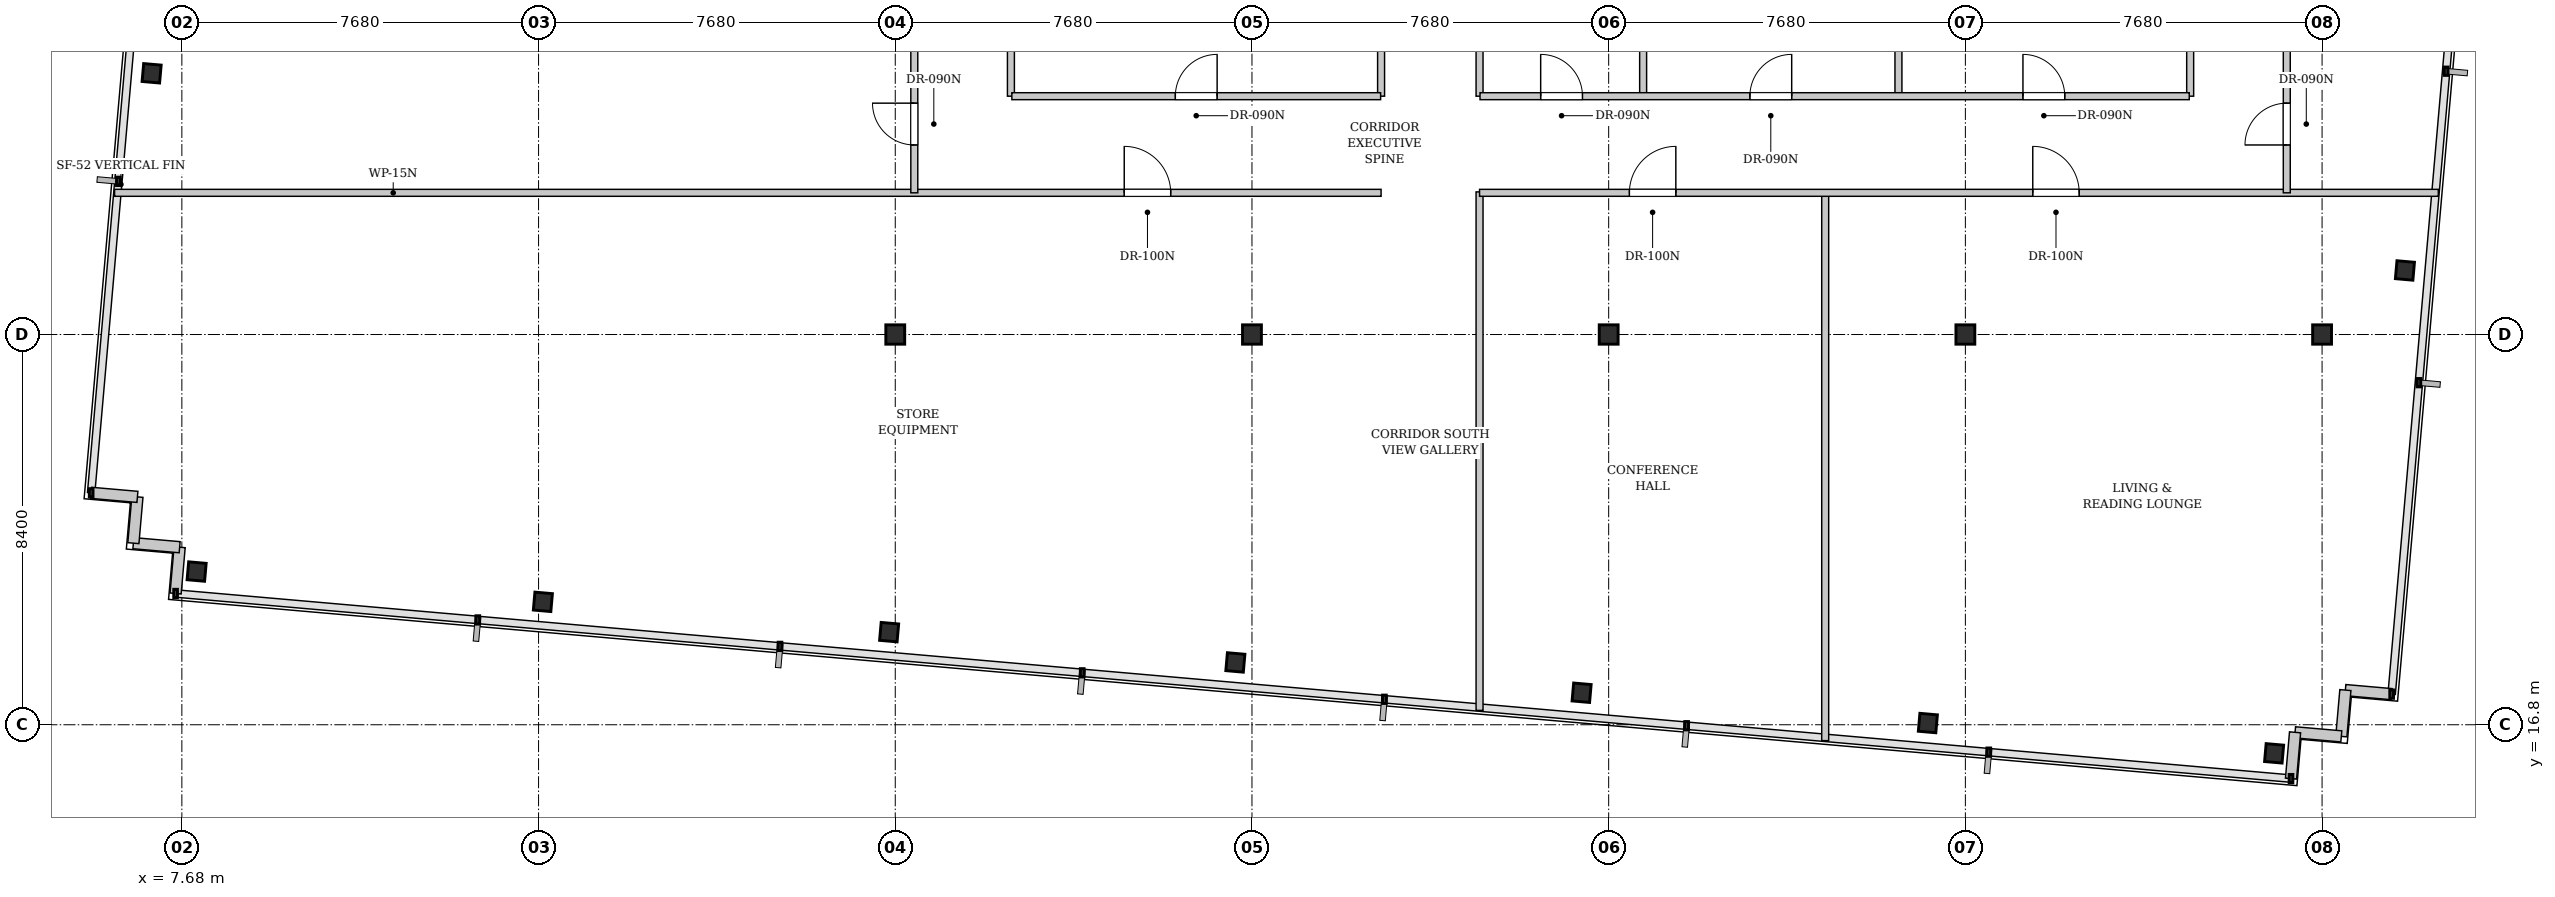
"""IFC4 building model, lengths in metres.
Left out: names, types, materials, properties, quantities, classifications, styles, units other than length and angle.
Written with IfcOpenShell. Run it as: python <this file> out.ifc"""

import sys

from ifc_helpers import new_model, si_unit, direction, frame, frame_2d, origin, origin_2d, place, context, subcontext, project, spatial, rectangle, i_section, extrude, element, fill, save


model = new_model("IFC4")
c1 = context("Model", 3, precision=1e-05, world=origin(), true_north=direction((0.0, 1.0)))
c2 = subcontext(c1, "Body", "Model", "MODEL_VIEW")
j1 = project(units=[si_unit("LENGTHUNIT", "METRE"), si_unit("PLANEANGLEUNIT", "RADIAN")], contexts=[c1])
p1 = place(None, origin())
s1 = spatial("IfcSite", under=j1, at=p1, CompositionType="ELEMENT")
p2 = place(p1, origin())
s2 = spatial("IfcBuilding", under=s1, at=p2, CompositionType="ELEMENT")
p3 = place(p2, frame((0.0, 0.0, 265.9)))
s3 = spatial("IfcBuildingStorey", under=s2, at=p3, CompositionType="ELEMENT", Elevation=265.9)
for number, where, z_axis, x_axis in (
    (1, (23.04, 25.2, 0.0), (0.0, 0.0, 1.0), (1.0, 0.0, 0.0)),
    (2, (30.72, 25.2, 0.0), (0.0, 0.0, 1.0), (1.0, 0.0, 0.0)),
    (3, (38.4, 25.2, 0.0), (0.0, 0.0, 1.0), (1.0, 0.0, 0.0)),
    (4, (46.08, 25.2, 0.0), (0.0, 0.0, 1.0), (1.0, 0.0, 0.0)),
    (5, (53.76, 25.2, 0.0), (0.0, 0.0, 1.0), (1.0, 0.0, 0.0)),
):
    element("IfcColumn", number, at=place(p3, frame(where, z_axis=z_axis, x_axis=x_axis)), inside=s3, PredefinedType="COLUMN", context=c2, shape_type="SweptSolid", body=[
        extrude(i_section(OverallWidth=0.406, OverallDepth=0.416, WebThickness=0.03, FlangeThickness=0.048, FilletRadius=0.015, at=origin_2d()), origin(), (0.0, 0.0, 1.0), 3.4),
    ])
for number, where, z_axis, x_axis in (
    (6, (7.998, 20.098, 0.0), (0.0, 0.0, 1.0), (0.996, -0.087, 0.0)),
    (7, (15.453, 19.446, 0.0), (0.0, 0.0, 1.0), (0.996, -0.087, 0.0)),
    (8, (22.908, 18.793, 0.0), (0.0, 0.0, 1.0), (0.996, -0.087, 0.0)),
    (9, (30.363, 18.141, 0.0), (0.0, 0.0, 1.0), (0.996, -0.087, 0.0)),
    (10, (37.817, 17.489, 0.0), (0.0, 0.0, 1.0), (0.996, -0.087, 0.0)),
    (11, (45.272, 16.837, 0.0), (0.0, 0.0, 1.0), (0.996, -0.087, 0.0)),
    (12, (52.727, 16.185, 0.0), (0.0, 0.0, 1.0), (0.996, -0.087, 0.0)),
    (13, (7.029, 30.823, 0.0), (0.0, 0.0, 1.0), (0.996, -0.087, 0.0)),
    (14, (55.544, 26.579, 0.0), (0.0, 0.0, 1.0), (0.996, -0.087, 0.0)),
):
    element("IfcColumn", number, at=place(p3, frame(where, z_axis=z_axis, x_axis=x_axis)), inside=s3, PredefinedType="COLUMN", context=c2, shape_type="SweptSolid", body=[
        extrude(i_section(OverallWidth=0.378, OverallDepth=0.387, WebThickness=0.021, FlangeThickness=0.033, FilletRadius=0.015, at=origin_2d()), origin(), (0.0, 0.0, 1.0), 3.4),
    ])
for number, where, z_axis, x_axis in (
    (15, (7.545, 19.625, 0.0), (0.0, 0.0, 1.0), (0.087, 0.996, 0.0)),
    (16, (7.632, 20.622, 0.0), (0.0, 0.0, 1.0), (-0.996, 0.087, 0.0)),
):
    element("IfcWall", number, at=place(p3, frame(where, z_axis=z_axis, x_axis=x_axis)), inside=s3, PredefinedType="SOLIDWALL", context=c2, shape_type="SweptSolid", body=[
        extrude(rectangle(XDim=1.0, YDim=0.24, at=frame_2d((0.5, 0.0))), origin(), (0.0, 0.0, 1.0), 3.18),
    ])
for number, where, z_axis, x_axis in (
    (17, (6.636, 20.709, 0.0), (0.0, 0.0, 1.0), (0.087, 0.996, 0.0)),
    (18, (6.723, 21.705, 0.0), (0.0, 0.0, 1.0), (-0.996, 0.087, 0.0)),
):
    element("IfcWall", number, at=place(p3, frame(where, z_axis=z_axis, x_axis=x_axis)), inside=s3, PredefinedType="SOLIDWALL", context=c2, shape_type="SweptSolid", body=[
        extrude(rectangle(XDim=1.0, YDim=0.24, at=frame_2d((0.5, 0.0))), origin(), (0.0, 0.0, 1.0), 3.18),
    ])
for number, where, z_axis, x_axis in (
    (19, (55.258, 17.459, 0.0), (0.0, 0.0, 1.0), (-0.996, 0.087, 0.0)),
    (20, (54.262, 17.546, 0.0), (0.0, 0.0, 1.0), (-0.087, -0.996, 0.0)),
):
    element("IfcWall", number, at=place(p3, frame(where, z_axis=z_axis, x_axis=x_axis)), inside=s3, PredefinedType="SOLIDWALL", context=c2, shape_type="SweptSolid", body=[
        extrude(rectangle(XDim=1.0, YDim=0.24, at=frame_2d((0.5, 0.0))), origin(), (0.0, 0.0, 1.0), 3.18),
    ])
for number, where, z_axis, x_axis in (
    (21, (54.175, 16.55, 0.0), (0.0, 0.0, 1.0), (-0.996, 0.087, 0.0)),
    (22, (53.178, 16.637, 0.0), (0.0, 0.0, 1.0), (-0.087, -0.996, 0.0)),
):
    element("IfcWall", number, at=place(p3, frame(where, z_axis=z_axis, x_axis=x_axis)), inside=s3, PredefinedType="SOLIDWALL", context=c2, shape_type="SweptSolid", body=[
        extrude(rectangle(XDim=1.0, YDim=0.24, at=frame_2d((0.5, 0.0))), origin(), (0.0, 0.0, 1.0), 3.18),
    ])
p4 = place(p3, frame((35.62, 17.109, 0.0), z_axis=(0.0, 0.0, 1.0), x_axis=(0.0, 1.0, 0.0)))
e23 = element("IfcWall", 23, at=p4, inside=s3, PredefinedType="PARTITIONING", context=c2, shape_type="SweptSolid", body=[
    extrude(rectangle(XDim=11.161, YDim=0.15, at=frame_2d((5.581, 0.0))), origin(), (0.0, 0.0, 1.0), 3.18),
])
p5 = place(p3, frame((43.062, 16.458, 0.0), z_axis=(0.0, 0.0, 1.0), x_axis=(0.0, 1.0, 0.0)))
e24 = element("IfcWall", 24, at=p5, inside=s3, PredefinedType="PARTITIONING", context=c2, shape_type="SweptSolid", body=[
    extrude(rectangle(XDim=11.812, YDim=0.15, at=frame_2d((5.906, 0.0))), origin(), (0.0, 0.0, 1.0), 3.18),
])
p6 = place(p3, frame((6.232, 28.25, 0.0), z_axis=(0.0, 0.0, 1.0), x_axis=(1.0, 0.0, 0.0)))
e25 = element("IfcWall", 25, at=p6, inside=s3, PredefinedType="PARTITIONING", context=c2, shape_type="SweptSolid", body=[
    extrude(rectangle(XDim=27.268, YDim=0.15, at=frame_2d((13.634, 0.0))), origin(), (0.0, 0.0, 1.0), 3.18),
])
p7 = place(p6, frame((21.738, 0.0, 0.0)))
e26 = element("IfcOpeningElement", 26, at=p7, cuts=e25, PredefinedType="OPENING", context=c2, shape_type="SweptSolid", body=[
    extrude(rectangle(XDim=1.0, YDim=2.15, at=frame_2d((0.5, 1.075))), frame((0.0, 0.085, 0.0), z_axis=(0.0, -1.0, 0.0), x_axis=(1.0, 0.0, 0.0)), (0.0, 0.0, 1.0), 0.17),
])
p8 = place(p3, frame((35.62, 28.25, 0.0), z_axis=(0.0, 0.0, 1.0), x_axis=(1.0, 0.0, 0.0)))
e27 = element("IfcWall", 27, at=p8, inside=s3, PredefinedType="PARTITIONING", context=c2, shape_type="SweptSolid", body=[
    extrude(rectangle(XDim=20.642, YDim=0.15, at=frame_2d((10.321, 0.0))), origin(), (0.0, 0.0, 1.0), 3.18),
])
p9 = place(p8, frame((3.226, 0.0, 0.0)))
e28 = element("IfcOpeningElement", 28, at=p9, cuts=e27, PredefinedType="OPENING", context=c2, shape_type="SweptSolid", body=[
    extrude(rectangle(XDim=1.0, YDim=2.15, at=frame_2d((0.5, 1.075))), frame((0.0, 0.085, 0.0), z_axis=(0.0, -1.0, 0.0), x_axis=(1.0, 0.0, 0.0)), (0.0, 0.0, 1.0), 0.17),
])
p10 = place(p8, frame((11.911, 0.0, 0.0)))
e29 = element("IfcOpeningElement", 29, at=p10, cuts=e27, PredefinedType="OPENING", context=c2, shape_type="SweptSolid", body=[
    extrude(rectangle(XDim=1.0, YDim=2.15, at=frame_2d((0.5, 1.075))), frame((0.0, 0.085, 0.0), z_axis=(0.0, -1.0, 0.0), x_axis=(1.0, 0.0, 0.0)), (0.0, 0.0, 1.0), 0.17),
])
p11 = place(p3, frame((23.45, 28.25, 0.0), z_axis=(0.0, 0.0, 1.0), x_axis=(0.0, 1.0, 0.0)))
e30 = element("IfcWall", 30, at=p11, inside=s3, PredefinedType="PARTITIONING", context=c2, shape_type="SweptSolid", body=[
    extrude(rectangle(XDim=6.89, YDim=0.15, at=frame_2d((3.445, 0.0))), origin(), (0.0, 0.0, 1.0), 3.18),
])
p12 = place(p11, frame((1.03, 0.0, 0.0)))
e31 = element("IfcOpeningElement", 31, at=p12, cuts=e30, PredefinedType="OPENING", context=c2, shape_type="SweptSolid", body=[
    extrude(rectangle(XDim=0.9, YDim=2.15, at=frame_2d((0.45, 1.075))), frame((0.0, 0.085, 0.0), z_axis=(0.0, -1.0, 0.0), x_axis=(1.0, 0.0, 0.0)), (0.0, 0.0, 1.0), 0.17),
])
p13 = place(p3, frame((53.0, 28.25, 0.0), z_axis=(0.0, 0.0, 1.0), x_axis=(0.0, 1.0, 0.0)))
e32 = element("IfcWall", 32, at=p13, inside=s3, PredefinedType="PARTITIONING", context=c2, shape_type="SweptSolid", body=[
    extrude(rectangle(XDim=6.89, YDim=0.15, at=frame_2d((3.445, 0.0))), origin(), (0.0, 0.0, 1.0), 3.18),
])
p14 = place(p13, frame((1.03, 0.0, 0.0)))
e33 = element("IfcOpeningElement", 33, at=p14, cuts=e32, PredefinedType="OPENING", context=c2, shape_type="SweptSolid", body=[
    extrude(rectangle(XDim=0.9, YDim=2.15, at=frame_2d((0.45, 1.075))), frame((0.0, 0.085, 0.0), z_axis=(0.0, -1.0, 0.0), x_axis=(1.0, 0.0, 0.0)), (0.0, 0.0, 1.0), 0.17),
])
for number, where, z_axis, x_axis in (
    (34, (25.53, 30.33, 0.0), (0.0, 0.0, 1.0), (0.0, 1.0, 0.0)),
    (35, (50.92, 30.33, 0.0), (0.0, 0.0, 1.0), (0.0, 1.0, 0.0)),
    (36, (33.5, 30.33, 0.0), (0.0, 0.0, 1.0), (0.0, 1.0, 0.0)),
    (37, (35.62, 30.33, 0.0), (0.0, 0.0, 1.0), (0.0, 1.0, 0.0)),
):
    element("IfcWall", number, at=place(p3, frame(where, z_axis=z_axis, x_axis=x_axis)), inside=s3, PredefinedType="PARTITIONING", context=c2, shape_type="SweptSolid", body=[
        extrude(rectangle(XDim=2.72, YDim=0.15, at=frame_2d((1.36, 0.0))), origin(), (0.0, 0.0, 1.0), 3.18),
    ])
p15 = place(p3, frame((25.55, 30.33, 0.0), z_axis=(0.0, 0.0, 1.0), x_axis=(1.0, 0.0, 0.0)))
e38 = element("IfcWall", 38, at=p15, inside=s3, PredefinedType="PARTITIONING", context=c2, shape_type="SweptSolid", body=[
    extrude(rectangle(XDim=7.94, YDim=0.15, at=frame_2d((3.97, 0.0))), origin(), (0.0, 0.0, 1.0), 3.18),
])
p16 = place(p15, frame((3.52, 0.0, 0.0)))
e39 = element("IfcOpeningElement", 39, at=p16, cuts=e38, PredefinedType="OPENING", context=c2, shape_type="SweptSolid", body=[
    extrude(rectangle(XDim=0.9, YDim=2.15, at=frame_2d((0.45, 1.075))), frame((0.0, 0.085, 0.0), z_axis=(0.0, -1.0, 0.0), x_axis=(1.0, 0.0, 0.0)), (0.0, 0.0, 1.0), 0.17),
])
for number, where, z_axis, x_axis in (
    (40, (39.142, 30.33, 0.0), (0.0, 0.0, 1.0), (0.0, 1.0, 0.0)),
    (41, (44.639, 30.33, 0.0), (0.0, 0.0, 1.0), (0.0, 1.0, 0.0)),
):
    element("IfcWall", number, at=place(p3, frame(where, z_axis=z_axis, x_axis=x_axis)), inside=s3, PredefinedType="PARTITIONING", context=c2, shape_type="SweptSolid", body=[
        extrude(rectangle(XDim=2.72, YDim=0.15, at=frame_2d((1.36, 0.0))), origin(), (0.0, 0.0, 1.0), 3.18),
    ])
p17 = place(p3, frame((35.63, 30.33, 0.0), z_axis=(0.0, 0.0, 1.0), x_axis=(1.0, 0.0, 0.0)))
e42 = element("IfcWall", 42, at=p17, inside=s3, PredefinedType="PARTITIONING", context=c2, shape_type="SweptSolid", body=[
    extrude(rectangle(XDim=15.27, YDim=0.15, at=frame_2d((7.635, 0.0))), origin(), (0.0, 0.0, 1.0), 3.18),
])
p18 = place(p17, frame((1.306, 0.0, 0.0)))
e43 = element("IfcOpeningElement", 43, at=p18, cuts=e42, PredefinedType="OPENING", context=c2, shape_type="SweptSolid", body=[
    extrude(rectangle(XDim=0.9, YDim=2.15, at=frame_2d((0.45, 1.075))), frame((0.0, 0.085, 0.0), z_axis=(0.0, -1.0, 0.0), x_axis=(1.0, 0.0, 0.0)), (0.0, 0.0, 1.0), 0.17),
])
p19 = place(p17, frame((5.811, 0.0, 0.0)))
e44 = element("IfcOpeningElement", 44, at=p19, cuts=e42, PredefinedType="OPENING", context=c2, shape_type="SweptSolid", body=[
    extrude(rectangle(XDim=0.9, YDim=2.15, at=frame_2d((0.45, 1.075))), frame((0.0, 0.085, 0.0), z_axis=(0.0, -1.0, 0.0), x_axis=(1.0, 0.0, 0.0)), (0.0, 0.0, 1.0), 0.17),
])
p20 = place(p17, frame((11.689, 0.0, 0.0)))
e45 = element("IfcOpeningElement", 45, at=p20, cuts=e42, PredefinedType="OPENING", context=c2, shape_type="SweptSolid", body=[
    extrude(rectangle(XDim=0.9, YDim=2.15, at=frame_2d((0.45, 1.075))), frame((0.0, 0.085, 0.0), z_axis=(0.0, -1.0, 0.0), x_axis=(1.0, 0.0, 0.0)), (0.0, 0.0, 1.0), 0.17),
])
p21 = place(p7, origin())
e46 = element("IfcDoor", 46, at=p21, inside=s3, OperationType="SINGLE_SWING_LEFT", PredefinedType="DOOR", context=c2, shape_type="SweptSolid", body=[
    extrude(rectangle(XDim=1.0, YDim=2.15, at=frame_2d((0.5, 1.075))), frame((0.0, 0.025, 0.0), z_axis=(0.0, -1.0, 0.0), x_axis=(1.0, 0.0, 0.0)), (0.0, 0.0, 1.0), 0.05),
])
fill(e26, e46)
p22 = place(p9, origin())
e47 = element("IfcDoor", 47, at=p22, inside=s3, OperationType="SINGLE_SWING_RIGHT", PredefinedType="DOOR", context=c2, shape_type="SweptSolid", body=[
    extrude(rectangle(XDim=1.0, YDim=2.15, at=frame_2d((0.5, 1.075))), frame((0.0, 0.025, 0.0), z_axis=(0.0, -1.0, 0.0), x_axis=(1.0, 0.0, 0.0)), (0.0, 0.0, 1.0), 0.05),
])
fill(e28, e47)
p23 = place(p10, origin())
e48 = element("IfcDoor", 48, at=p23, inside=s3, OperationType="SINGLE_SWING_LEFT", PredefinedType="DOOR", context=c2, shape_type="SweptSolid", body=[
    extrude(rectangle(XDim=1.0, YDim=2.15, at=frame_2d((0.5, 1.075))), frame((0.0, 0.025, 0.0), z_axis=(0.0, -1.0, 0.0), x_axis=(1.0, 0.0, 0.0)), (0.0, 0.0, 1.0), 0.05),
])
fill(e29, e48)
p24 = place(p12, origin())
e49 = element("IfcDoor", 49, at=p24, inside=s3, OperationType="SINGLE_SWING_RIGHT", PredefinedType="DOOR", context=c2, shape_type="SweptSolid", body=[
    extrude(rectangle(XDim=0.9, YDim=2.15, at=frame_2d((0.45, 1.075))), frame((0.0, 0.025, 0.0), z_axis=(0.0, -1.0, 0.0), x_axis=(1.0, 0.0, 0.0)), (0.0, 0.0, 1.0), 0.05),
])
fill(e31, e49)
p25 = place(p14, origin())
e50 = element("IfcDoor", 50, at=p25, inside=s3, OperationType="SINGLE_SWING_LEFT", PredefinedType="DOOR", context=c2, shape_type="SweptSolid", body=[
    extrude(rectangle(XDim=0.9, YDim=2.15, at=frame_2d((0.45, 1.075))), frame((0.0, 0.025, 0.0), z_axis=(0.0, -1.0, 0.0), x_axis=(1.0, 0.0, 0.0)), (0.0, 0.0, 1.0), 0.05),
])
fill(e33, e50)
p26 = place(p16, origin())
e51 = element("IfcDoor", 51, at=p26, inside=s3, OperationType="SINGLE_SWING_RIGHT", PredefinedType="DOOR", context=c2, shape_type="SweptSolid", body=[
    extrude(rectangle(XDim=0.9, YDim=2.15, at=frame_2d((0.45, 1.075))), frame((0.0, 0.025, 0.0), z_axis=(0.0, -1.0, 0.0), x_axis=(1.0, 0.0, 0.0)), (0.0, 0.0, 1.0), 0.05),
])
fill(e39, e51)
p27 = place(p18, origin())
e52 = element("IfcDoor", 52, at=p27, inside=s3, OperationType="SINGLE_SWING_LEFT", PredefinedType="DOOR", context=c2, shape_type="SweptSolid", body=[
    extrude(rectangle(XDim=0.9, YDim=2.15, at=frame_2d((0.45, 1.075))), frame((0.0, 0.025, 0.0), z_axis=(0.0, -1.0, 0.0), x_axis=(1.0, 0.0, 0.0)), (0.0, 0.0, 1.0), 0.05),
])
fill(e43, e52)
p28 = place(p19, origin())
e53 = element("IfcDoor", 53, at=p28, inside=s3, OperationType="SINGLE_SWING_RIGHT", PredefinedType="DOOR", context=c2, shape_type="SweptSolid", body=[
    extrude(rectangle(XDim=0.9, YDim=2.15, at=frame_2d((0.45, 1.075))), frame((0.0, 0.025, 0.0), z_axis=(0.0, -1.0, 0.0), x_axis=(1.0, 0.0, 0.0)), (0.0, 0.0, 1.0), 0.05),
])
fill(e44, e53)
p29 = place(p20, origin())
e54 = element("IfcDoor", 54, at=p29, inside=s3, OperationType="SINGLE_SWING_LEFT", PredefinedType="DOOR", context=c2, shape_type="SweptSolid", body=[
    extrude(rectangle(XDim=0.9, YDim=2.15, at=frame_2d((0.45, 1.075))), frame((0.0, 0.025, 0.0), z_axis=(0.0, -1.0, 0.0), x_axis=(1.0, 0.0, 0.0)), (0.0, 0.0, 1.0), 0.05),
])
fill(e45, e54)
save(model, sys.argv[1])
